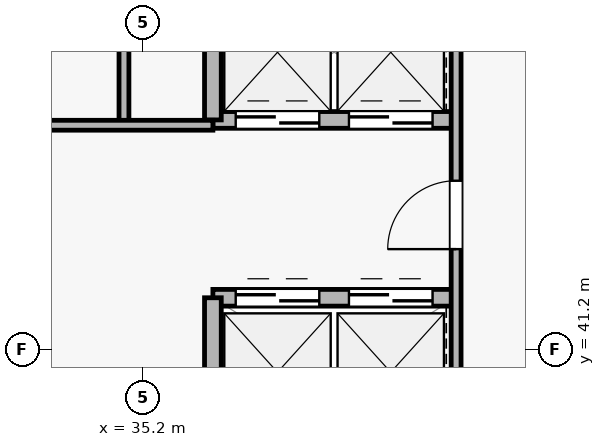
"""IFC4 building model, lengths in metres.
Left out: names, types, materials, properties, quantities, classifications, styles, units other than length and angle.
Written with IfcOpenShell. Run it as: python <this file> out.ifc"""

import sys

from ifc_helpers import new_model, si_unit, direction, frame, frame_2d, origin, place, context, subcontext, project, spatial, rectangle, extrude, source, transform, mapped, element, fill, save


model = new_model("IFC4")
c1 = context("Model", 3, precision=1e-05, world=origin(), true_north=direction((0.0, 1.0)))
c2 = subcontext(c1, "Body", "Model", "MODEL_VIEW")
j1 = project(units=[si_unit("LENGTHUNIT", "METRE"), si_unit("PLANEANGLEUNIT", "RADIAN")], contexts=[c1])
p1 = place(None, origin())
s1 = spatial("IfcSite", under=j1, at=p1, CompositionType="ELEMENT")
p2 = place(p1, origin())
s2 = spatial("IfcBuilding", under=s1, at=p2, CompositionType="ELEMENT")
p3 = place(p2, frame((0.0, 0.0, 317.6)))
s3 = spatial("IfcBuildingStorey", under=s2, at=p3, CompositionType="ELEMENT", Elevation=317.6)
p4 = place(p3, frame((36.12, 44.22, 0.0), z_axis=(0.0, 0.0, 1.0), x_axis=(1.0, 0.0, 0.0)))
e1 = element("IfcWall", 1, at=p4, inside=s3, PredefinedType="SOLIDWALL", context=c2, shape_type="SweptSolid", body=[
    extrude(rectangle(XDim=3.2, YDim=0.22, at=frame_2d((1.6, 0.0))), origin(), (0.0, 0.0, 1.0), 3.185),
])
p5 = place(p4, frame((0.3, 0.0, 0.0)))
e2 = element("IfcOpeningElement", 2, at=p5, cuts=e1, PredefinedType="OPENING", context=c2, shape_type="SweptSolid", body=[
    extrude(rectangle(XDim=1.1, YDim=2.2, at=frame_2d((0.55, 1.1))), frame((0.0, 0.12, 0.0), z_axis=(0.0, -1.0, 0.0), x_axis=(1.0, 0.0, 0.0)), (0.0, 0.0, 1.0), 0.24),
])
p6 = place(p4, frame((1.79, 0.0, 0.0)))
e3 = element("IfcOpeningElement", 3, at=p6, cuts=e1, PredefinedType="OPENING", context=c2, shape_type="SweptSolid", body=[
    extrude(rectangle(XDim=1.1, YDim=2.2, at=frame_2d((0.55, 1.1))), frame((0.0, 0.12, 0.0), z_axis=(0.0, -1.0, 0.0), x_axis=(1.0, 0.0, 0.0)), (0.0, 0.0, 1.0), 0.24),
])
p7 = place(p3, frame((36.12, 41.88, 0.0), z_axis=(0.0, 0.0, 1.0), x_axis=(1.0, 0.0, 0.0)))
e4 = element("IfcWall", 4, at=p7, inside=s3, PredefinedType="SOLIDWALL", context=c2, shape_type="SweptSolid", body=[
    extrude(rectangle(XDim=3.2, YDim=0.22, at=frame_2d((1.6, 0.0))), origin(), (0.0, 0.0, 1.0), 3.185),
])
p8 = place(p7, frame((0.3, 0.0, 0.0)))
e5 = element("IfcOpeningElement", 5, at=p8, cuts=e4, PredefinedType="OPENING", context=c2, shape_type="SweptSolid", body=[
    extrude(rectangle(XDim=1.1, YDim=2.2, at=frame_2d((0.55, 1.1))), frame((0.0, 0.12, 0.0), z_axis=(0.0, -1.0, 0.0), x_axis=(1.0, 0.0, 0.0)), (0.0, 0.0, 1.0), 0.24),
])
p9 = place(p7, frame((1.79, 0.0, 0.0)))
e6 = element("IfcOpeningElement", 6, at=p9, cuts=e4, PredefinedType="OPENING", context=c2, shape_type="SweptSolid", body=[
    extrude(rectangle(XDim=1.1, YDim=2.2, at=frame_2d((0.55, 1.1))), frame((0.0, 0.12, 0.0), z_axis=(0.0, -1.0, 0.0), x_axis=(1.0, 0.0, 0.0)), (0.0, 0.0, 1.0), 0.24),
])
p10 = place(p3, frame((36.12, 39.92, 0.0), z_axis=(0.0, 0.0, 1.0), x_axis=(0.0, 1.0, 0.0)))
e7 = element("IfcWall", 7, at=p10, inside=s3, PredefinedType="SOLIDWALL", context=c2, shape_type="SweptSolid", body=[
    extrude(rectangle(XDim=1.96, YDim=0.22, at=frame_2d((0.98, 0.0))), origin(), (0.0, 0.0, 1.0), 3.185),
])
p11 = place(p3, frame((36.12, 44.22, 0.0), z_axis=(0.0, 0.0, 1.0), x_axis=(0.0, 1.0, 0.0)))
e8 = element("IfcWall", 8, at=p11, inside=s3, PredefinedType="SOLIDWALL", context=c2, shape_type="SweptSolid", body=[
    extrude(rectangle(XDim=2.15, YDim=0.22, at=frame_2d((1.075, 0.0))), origin(), (0.0, 0.0, 1.0), 3.185),
])
p12 = place(p3, frame((34.95, 44.15, 0.0), z_axis=(0.0, 0.0, 1.0), x_axis=(0.0, 1.0, 0.0)))
e9 = element("IfcWall", 9, at=p12, inside=s3, PredefinedType="PARTITIONING", context=c2, shape_type="SweptSolid", body=[
    extrude(rectangle(XDim=2.22, YDim=0.13, at=frame_2d((1.11, 0.0))), origin(), (0.0, 0.0, 1.0), 3.185),
])
p13 = place(p3, frame((33.18, 44.15, 0.0), z_axis=(0.0, 0.0, 1.0), x_axis=(1.0, 0.0, 0.0)))
e10 = element("IfcWall", 10, at=p13, inside=s3, PredefinedType="PARTITIONING", context=c2, shape_type="SweptSolid", body=[
    extrude(rectangle(XDim=2.94, YDim=0.13, at=frame_2d((1.47, 0.0))), origin(), (0.0, 0.0, 1.0), 2.47),
])
p14 = place(p3, frame((39.32, 37.63, 0.0), z_axis=(0.0, 0.0, 1.0), x_axis=(0.0, 1.0, 0.0)))
e11 = element("IfcWall", 11, at=p14, inside=s3, PredefinedType="PARTITIONING", context=c2, shape_type="SweptSolid", body=[
    extrude(rectangle(XDim=8.74, YDim=0.13, at=frame_2d((4.37, 0.0))), origin(), (0.0, 0.0, 1.0), 3.185),
])
p15 = place(p14, frame((4.89, 0.0, 0.0)))
e12 = element("IfcOpeningElement", 12, at=p15, cuts=e11, PredefinedType="OPENING", context=c2, shape_type="SweptSolid", body=[
    extrude(rectangle(XDim=0.9, YDim=2.1, at=frame_2d((0.45, 1.05))), frame((0.0, 0.075, 0.0), z_axis=(0.0, -1.0, 0.0), x_axis=(1.0, 0.0, 0.0)), (0.0, 0.0, 1.0), 0.15),
])
m1 = source(origin(), c2, "Body", "SweptSolid", [
    extrude(rectangle(XDim=1.1, YDim=2.2, at=frame_2d((0.55, 1.1))), frame((0.0, 0.025, 0.0), z_axis=(0.0, -1.0, 0.0), x_axis=(1.0, 0.0, 0.0)), (0.0, 0.0, 1.0), 0.05),
])
p16 = place(p5, origin())
e13 = element("IfcDoor", 13, at=p16, inside=s3, OperationType="SLIDING_TO_LEFT", PredefinedType="DOOR", context=c2, shape_type="MappedRepresentation", body=[
    mapped(m1, transform((0.0, 0.0, 0.0), x_axis=(1.0, 0.0, 0.0), y_axis=(0.0, 1.0, 0.0), z_axis=(0.0, 0.0, 1.0), scale=1.0)),
])
fill(e2, e13)
p17 = place(p6, origin())
e14 = element("IfcDoor", 14, at=p17, inside=s3, OperationType="SLIDING_TO_LEFT", PredefinedType="DOOR", context=c2, shape_type="MappedRepresentation", body=[
    mapped(m1, transform((0.0, 0.0, 0.0), x_axis=(1.0, 0.0, 0.0), y_axis=(0.0, 1.0, 0.0), z_axis=(0.0, 0.0, 1.0), scale=1.0)),
])
fill(e3, e14)
p18 = place(p8, origin())
e15 = element("IfcDoor", 15, at=p18, inside=s3, OperationType="SLIDING_TO_LEFT", PredefinedType="DOOR", context=c2, shape_type="MappedRepresentation", body=[
    mapped(m1, transform((0.0, 0.0, 0.0), x_axis=(1.0, 0.0, 0.0), y_axis=(0.0, 1.0, 0.0), z_axis=(0.0, 0.0, 1.0), scale=1.0)),
])
fill(e5, e15)
p19 = place(p9, origin())
e16 = element("IfcDoor", 16, at=p19, inside=s3, OperationType="SLIDING_TO_LEFT", PredefinedType="DOOR", context=c2, shape_type="MappedRepresentation", body=[
    mapped(m1, transform((0.0, 0.0, 0.0), x_axis=(1.0, 0.0, 0.0), y_axis=(0.0, 1.0, 0.0), z_axis=(0.0, 0.0, 1.0), scale=1.0)),
])
fill(e6, e16)
m2 = source(origin(), c2, "Body", "SweptSolid", [
    extrude(rectangle(XDim=0.9, YDim=2.1, at=frame_2d((0.45, 1.05))), frame((0.0, 0.025, 0.0), z_axis=(0.0, -1.0, 0.0), x_axis=(1.0, 0.0, 0.0)), (0.0, 0.0, 1.0), 0.05),
])
p20 = place(p15, origin())
e17 = element("IfcDoor", 17, at=p20, inside=s3, OperationType="SINGLE_SWING_LEFT", PredefinedType="DOOR", context=c2, shape_type="MappedRepresentation", body=[
    mapped(m2, transform((0.0, 0.0, 0.0), x_axis=(1.0, 0.0, 0.0), y_axis=(0.0, 1.0, 0.0), z_axis=(0.0, 0.0, 1.0), scale=1.0)),
])
fill(e12, e17)
save(model, sys.argv[1])
